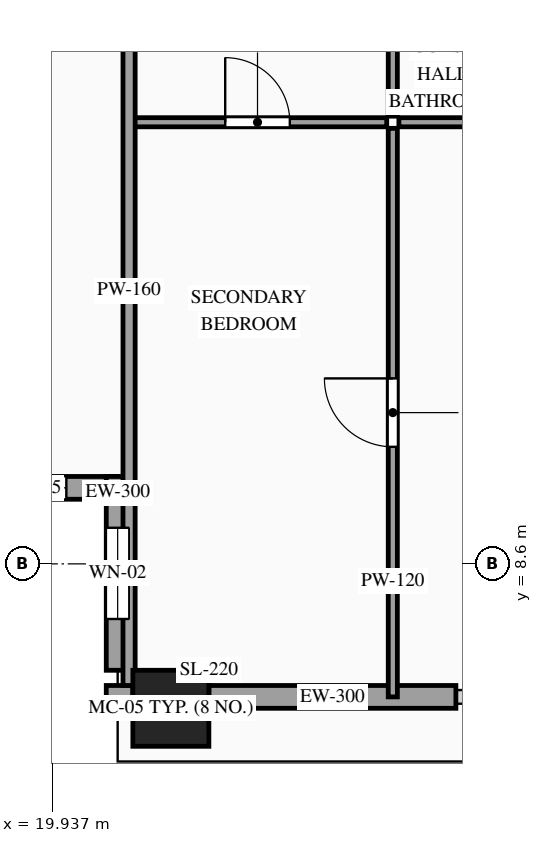
"""IFC4 building model, lengths in metres.
Left out: names, types, materials, properties, quantities, classifications, styles, units other than length and angle.
Written with IfcOpenShell. Run it as: python <this file> out.ifc"""

import sys

from ifc_helpers import new_model, si_unit, direction, frame, frame_2d, origin, origin_2d, place, context, subcontext, project, spatial, rectangle, hollow_rectangle, extrude, source, transform, mapped, element, fill, save


model = new_model("IFC4")
c1 = context("Model", 3, precision=1e-05, world=origin(), true_north=direction((0.0, 1.0)))
c2 = subcontext(c1, "Body", "Model", "MODEL_VIEW")
j1 = project(units=[si_unit("LENGTHUNIT", "METRE"), si_unit("PLANEANGLEUNIT", "RADIAN")], contexts=[c1])
p1 = place(None, origin())
s1 = spatial("IfcSite", under=j1, at=p1, CompositionType="ELEMENT")
p2 = place(p1, origin())
s2 = spatial("IfcBuilding", under=s1, at=p2, CompositionType="ELEMENT")
p3 = place(p2, frame((0.0, 0.0, 335.7)))
s3 = spatial("IfcBuildingStorey", under=s2, at=p3, CompositionType="ELEMENT", Elevation=335.7)
m1 = source(origin(), c2, "Body", "SweptSolid", [
    extrude(hollow_rectangle(XDim=1.0, YDim=1.0, WallThickness=0.048, at=origin_2d()), origin(), (0.0, 0.0, 1.0), 3.5),
])
p4 = place(p3, frame((21.5, 6.7, 0.0), z_axis=(0.0, 0.0, 1.0), x_axis=(1.0, 0.0, 0.0)))
e1 = element("IfcColumn", 1, at=p4, inside=s3, PredefinedType="COLUMN", context=c2, shape_type="MappedRepresentation", body=[
    mapped(m1, transform((0.0, 0.0, 0.0), scale=1.0)),
])
p5 = place(p3, frame((18.4, 9.6, 0.0), z_axis=(0.0, 0.0, 1.0), x_axis=(1.0, 0.0, 0.0)))
e2 = element("IfcWall", 2, at=p5, inside=s3, PredefinedType="SOLIDWALL", context=c2, shape_type="SweptSolid", body=[
    extrude(rectangle(XDim=2.55, YDim=0.3, at=frame_2d((1.275, 0.0))), origin(), (0.0, 0.0, 1.0), 3.26),
])
p6 = place(p5, frame((0.825, 0.0, 0.85)))
e3 = element("IfcOpeningElement", 3, at=p6, cuts=e2, PredefinedType="OPENING", context=c2, shape_type="SweptSolid", body=[
    extrude(rectangle(XDim=0.9, YDim=1.5, at=frame_2d((0.45, 0.75))), frame((0.0, 0.165, 0.0), z_axis=(0.0, -1.0, 0.0), x_axis=(1.0, 0.0, 0.0)), (0.0, 0.0, 1.0), 0.33),
])
p7 = place(p3, frame((20.8, 9.75, 0.0), z_axis=(0.0, 0.0, 1.0), x_axis=(0.0, -1.0, 0.0)))
e4 = element("IfcWall", 4, at=p7, inside=s3, PredefinedType="SOLIDWALL", context=c2, shape_type="SweptSolid", body=[
    extrude(rectangle(XDim=2.55, YDim=0.3, at=frame_2d((1.275, 0.0))), origin(), (0.0, 0.0, 1.0), 3.26),
])
p8 = place(p7, frame((0.675, 0.0, 0.85)))
e5 = element("IfcOpeningElement", 5, at=p8, cuts=e4, PredefinedType="OPENING", context=c2, shape_type="SweptSolid", body=[
    extrude(rectangle(XDim=1.2, YDim=2.1, at=frame_2d((0.6, 1.05))), frame((0.0, 0.165, 0.0), z_axis=(0.0, -1.0, 0.0), x_axis=(1.0, 0.0, 0.0)), (0.0, 0.0, 1.0), 0.33),
])
m2 = source(origin(), c2, "Body", "SweptSolid", [
    extrude(rectangle(XDim=0.35, YDim=0.3, at=frame_2d((0.175, 0.0))), origin(), (0.0, 0.0, 1.0), 3.26),
])
p9 = place(p3, frame((20.65, 6.85, 0.0), z_axis=(0.0, 0.0, 1.0), x_axis=(1.0, 0.0, 0.0)))
e6 = element("IfcWall", 6, at=p9, inside=s3, PredefinedType="SOLIDWALL", context=c2, shape_type="MappedRepresentation", body=[
    mapped(m2, transform((0.0, 0.0, 0.0), scale=1.0)),
])
m3 = source(origin(), c2, "Body", "SweptSolid", [
    extrude(rectangle(XDim=3.25, YDim=0.3, at=frame_2d((1.625, 0.0))), origin(), (0.0, 0.0, 1.0), 2.865),
])
p10 = place(p3, frame((22.0, 6.85, 0.0), z_axis=(0.0, 0.0, 1.0), x_axis=(1.0, 0.0, 0.0)))
e7 = element("IfcWall", 7, at=p10, inside=s3, PredefinedType="SOLIDWALL", context=c2, shape_type="MappedRepresentation", body=[
    mapped(m3, transform((0.0, 0.0, 0.0), scale=1.0)),
])
p11 = place(p3, frame((20.94, 14.41, 0.0), z_axis=(0.0, 0.0, 1.0), x_axis=(1.0, 0.0, 0.0)))
e8 = element("IfcWall", 8, at=p11, inside=s3, PredefinedType="PARTITIONING", context=c2, shape_type="SweptSolid", body=[
    extrude(rectangle(XDim=3.4, YDim=0.12, at=frame_2d((1.7, 0.0))), origin(), (0.0, 0.0, 1.0), 3.26),
])
p12 = place(p11, frame((1.275, 0.0, 0.0)))
e9 = element("IfcOpeningElement", 9, at=p12, cuts=e8, PredefinedType="OPENING", context=c2, shape_type="SweptSolid", body=[
    extrude(rectangle(XDim=0.85, YDim=2.1, at=frame_2d((0.425, 1.05))), frame((0.0, 0.075, 0.0), z_axis=(0.0, -1.0, 0.0), x_axis=(1.0, 0.0, 0.0)), (0.0, 0.0, 1.0), 0.15),
])
m4 = source(origin(), c2, "Body", "SweptSolid", [
    extrude(rectangle(XDim=2.9, YDim=0.12, at=frame_2d((1.45, 0.0))), origin(), (0.0, 0.0, 1.0), 3.26),
])
p13 = place(p3, frame((24.42, 14.49, 0.0), z_axis=(0.0, 0.0, 1.0), x_axis=(0.0, 1.0, 0.0)))
e10 = element("IfcWall", 10, at=p13, inside=s3, PredefinedType="PARTITIONING", context=c2, shape_type="MappedRepresentation", body=[
    mapped(m4, transform((0.0, 0.0, 0.0), scale=1.0)),
])
m5 = source(origin(), c2, "Body", "SweptSolid", [
    extrude(rectangle(XDim=1.523, YDim=0.12, at=frame_2d((0.761, 0.0))), origin(), (0.0, 0.0, 1.0), 3.26),
])
p14 = place(p3, frame((24.5, 14.41, 0.0), z_axis=(0.0, 0.0, 1.0), x_axis=(1.0, 0.0, 0.0)))
e11 = element("IfcWall", 11, at=p14, inside=s3, PredefinedType="PARTITIONING", context=c2, shape_type="MappedRepresentation", body=[
    mapped(m5, transform((0.0, 0.0, 0.0), scale=1.0)),
])
p15 = place(p3, frame((24.42, 6.85, 0.0), z_axis=(0.0, 0.0, 1.0), x_axis=(0.0, 1.0, 0.0)))
e12 = element("IfcWall", 12, at=p15, inside=s3, PredefinedType="PARTITIONING", context=c2, shape_type="SweptSolid", body=[
    extrude(rectangle(XDim=7.48, YDim=0.12, at=frame_2d((3.74, 0.0))), origin(), (0.0, 0.0, 1.0), 3.26),
])
p16 = place(p15, frame((3.29, 0.0, 0.0)))
e13 = element("IfcOpeningElement", 13, at=p16, cuts=e12, PredefinedType="OPENING", context=c2, shape_type="SweptSolid", body=[
    extrude(rectangle(XDim=0.9, YDim=2.15, at=frame_2d((0.45, 1.075))), frame((0.0, 0.075, 0.0), z_axis=(0.0, -1.0, 0.0), x_axis=(1.0, 0.0, 0.0)), (0.0, 0.0, 1.0), 0.15),
])
m6 = source(origin(), c2, "Body", "SweptSolid", [
    extrude(rectangle(XDim=10.39, YDim=0.16, at=frame_2d((5.195, 0.0))), origin(), (0.0, 0.0, 1.0), 3.26),
])
p17 = place(p3, frame((20.95, 7.0, 0.0), z_axis=(0.0, 0.0, 1.0), x_axis=(0.0, 1.0, 0.0)))
e14 = element("IfcWall", 14, at=p17, inside=s3, PredefinedType="PARTITIONING", context=c2, shape_type="MappedRepresentation", body=[
    mapped(m6, transform((0.0, 0.0, 0.0), scale=1.0)),
])
m7 = source(origin(), c2, "Body", "SweptSolid", [
    extrude(rectangle(XDim=0.9, YDim=1.5, at=frame_2d((0.45, 0.75))), frame((0.0, 0.03, 0.0), z_axis=(0.0, -1.0, 0.0), x_axis=(1.0, 0.0, 0.0)), (0.0, 0.0, 1.0), 0.06),
])
p18 = place(p6, origin())
e15 = element("IfcWindow", 15, at=p18, inside=s3, PartitioningType="SINGLE_PANEL", PredefinedType="WINDOW", context=c2, shape_type="MappedRepresentation", body=[
    mapped(m7, transform((0.0, 0.0, 0.0), scale=1.0)),
])
fill(e3, e15)
m8 = source(origin(), c2, "Body", "SweptSolid", [
    extrude(rectangle(XDim=1.2, YDim=2.1, at=frame_2d((0.6, 1.05))), frame((0.0, 0.03, 0.0), z_axis=(0.0, -1.0, 0.0), x_axis=(1.0, 0.0, 0.0)), (0.0, 0.0, 1.0), 0.06),
])
p19 = place(p8, origin())
e16 = element("IfcWindow", 16, at=p19, inside=s3, PartitioningType="SINGLE_PANEL", PredefinedType="WINDOW", context=c2, shape_type="MappedRepresentation", body=[
    mapped(m8, transform((0.0, 0.0, 0.0), scale=1.0)),
])
fill(e5, e16)
m9 = source(origin(), c2, "Body", "SweptSolid", [
    extrude(rectangle(XDim=0.85, YDim=2.1, at=frame_2d((0.425, 1.05))), frame((0.0, 0.025, 0.0), z_axis=(0.0, -1.0, 0.0), x_axis=(1.0, 0.0, 0.0)), (0.0, 0.0, 1.0), 0.05),
])
p20 = place(p12, origin())
e17 = element("IfcDoor", 17, at=p20, inside=s3, OperationType="SINGLE_SWING_LEFT", PredefinedType="DOOR", context=c2, shape_type="MappedRepresentation", body=[
    mapped(m9, transform((0.0, 0.0, 0.0), scale=1.0)),
])
fill(e9, e17)
m10 = source(origin(), c2, "Body", "SweptSolid", [
    extrude(rectangle(XDim=0.9, YDim=2.15, at=frame_2d((0.45, 1.075))), frame((0.0, 0.025, 0.0), z_axis=(0.0, -1.0, 0.0), x_axis=(1.0, 0.0, 0.0)), (0.0, 0.0, 1.0), 0.05),
])
p21 = place(p16, origin())
e18 = element("IfcDoor", 18, at=p21, inside=s3, OperationType="SINGLE_SWING_RIGHT", PredefinedType="DOOR", context=c2, shape_type="MappedRepresentation", body=[
    mapped(m10, transform((0.0, 0.0, 0.0), scale=1.0)),
])
fill(e13, e18)
save(model, sys.argv[1])
